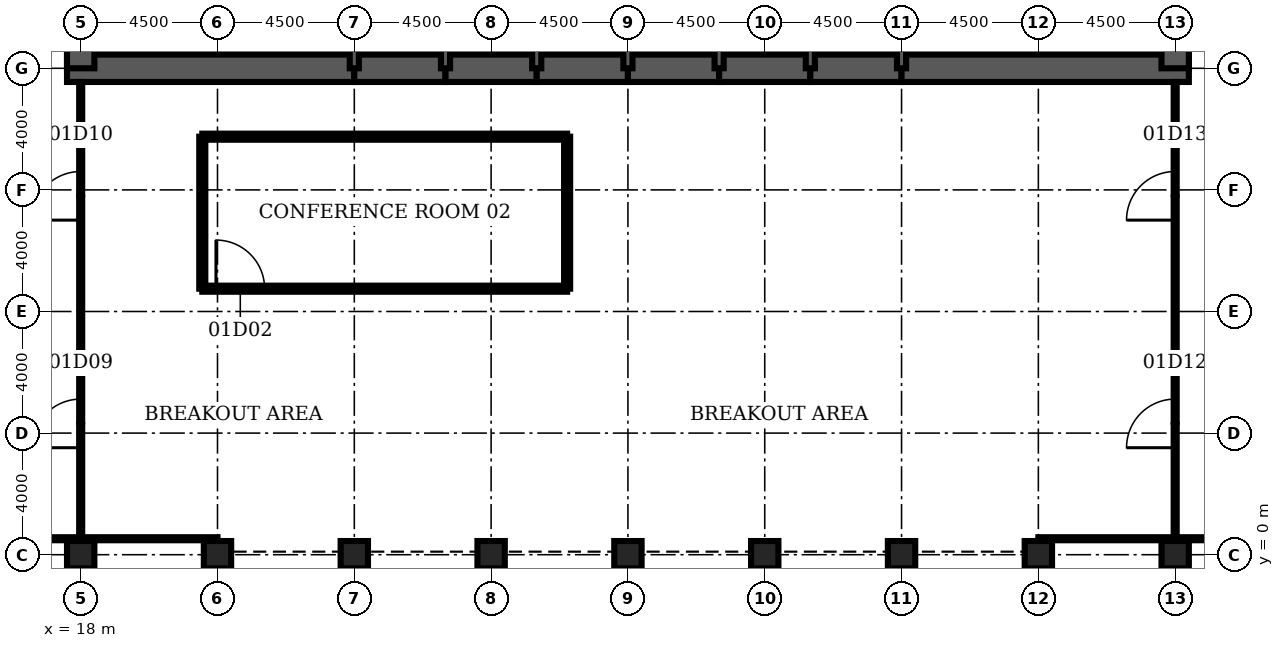
"""IFC4 building model, lengths in metres.
Left out: names, types, materials, properties, quantities, classifications, styles, units other than length and angle.
Written with IfcOpenShell. Run it as: python <this file> out.ifc"""

import sys

from ifc_helpers import new_model, si_unit, direction, frame, frame_2d, origin, origin_2d, place, context, subcontext, project, spatial, rectangle, hollow_rectangle, extrude, element, fill, save


model = new_model("IFC4")
c1 = context("Model", 3, precision=1e-05, world=origin(), true_north=direction((0.0, 1.0)))
c2 = subcontext(c1, "Body", "Model", "MODEL_VIEW")
j1 = project(units=[si_unit("LENGTHUNIT", "METRE"), si_unit("PLANEANGLEUNIT", "RADIAN")], contexts=[c1])
p1 = place(None, origin())
s1 = spatial("IfcSite", under=j1, at=p1, CompositionType="ELEMENT")
p2 = place(p1, origin())
s2 = spatial("IfcBuilding", under=s1, at=p2, CompositionType="ELEMENT")
p3 = place(p2, frame((0.0, 0.0, 6.0)))
s3 = spatial("IfcBuildingStorey", under=s2, at=p3, CompositionType="ELEMENT", Elevation=6.0)
for number, where, z_axis, x_axis in (
    (1, (18.0, 0.0, 0.0), (0.0, 0.0, 1.0), (0.0, 1.0, 0.0)),
    (2, (22.5, 0.0, 0.0), (0.0, 0.0, 1.0), (0.0, 1.0, 0.0)),
    (3, (27.0, 0.0, 0.0), (0.0, 0.0, 1.0), (0.0, 1.0, 0.0)),
    (4, (31.5, 0.0, 0.0), (0.0, 0.0, 1.0), (0.0, 1.0, 0.0)),
    (5, (36.0, 0.0, 0.0), (0.0, 0.0, 1.0), (0.0, 1.0, 0.0)),
    (6, (40.5, 0.0, 0.0), (0.0, 0.0, 1.0), (0.0, 1.0, 0.0)),
    (7, (45.0, 0.0, 0.0), (0.0, 0.0, 1.0), (0.0, 1.0, 0.0)),
    (8, (49.5, 0.0, 0.0), (0.0, 0.0, 1.0), (0.0, 1.0, 0.0)),
    (9, (54.0, 0.0, 0.0), (0.0, 0.0, 1.0), (0.0, 1.0, 0.0)),
):
    element("IfcColumn", number, at=place(p3, frame(where, z_axis=z_axis, x_axis=x_axis)), inside=s3, PredefinedType="COLUMN", context=c2, shape_type="SweptSolid", body=[
        extrude(hollow_rectangle(XDim=0.9, YDim=0.9, WallThickness=0.12, at=origin_2d()), origin(), (0.0, 0.0, 1.0), 7.0),
    ])
p4 = place(p3, frame((17.55, 16.0, 0.0), z_axis=(0.0, 0.0, 1.0), x_axis=(1.0, 0.0, 0.0)))
e10 = element("IfcWall", 10, at=p4, inside=s3, PredefinedType="SHEAR", context=c2, shape_type="SweptSolid", body=[
    extrude(rectangle(XDim=9.45, YDim=0.9, at=frame_2d((4.725, 0.0))), origin(), (0.0, 0.0, 1.0), 7.0),
])
for number, where, z_axis, x_axis in (
    (11, (27.0, 16.0, 0.0), (0.0, 0.0, 1.0), (1.0, 0.0, 0.0)),
    (12, (30.0, 16.0, 0.0), (0.0, 0.0, 1.0), (1.0, 0.0, 0.0)),
    (13, (33.0, 16.0, 0.0), (0.0, 0.0, 1.0), (1.0, 0.0, 0.0)),
    (14, (36.0, 16.0, 0.0), (0.0, 0.0, 1.0), (1.0, 0.0, 0.0)),
    (15, (39.0, 16.0, 0.0), (0.0, 0.0, 1.0), (1.0, 0.0, 0.0)),
    (16, (42.0, 16.0, 0.0), (0.0, 0.0, 1.0), (1.0, 0.0, 0.0)),
):
    element("IfcWall", number, at=place(p3, frame(where, z_axis=z_axis, x_axis=x_axis)), inside=s3, PredefinedType="SHEAR", context=c2, shape_type="SweptSolid", body=[
        extrude(rectangle(XDim=3.0, YDim=0.9, at=frame_2d((1.5, 0.0))), origin(), (0.0, 0.0, 1.0), 7.0),
    ])
p5 = place(p3, frame((45.0, 16.0, 0.0), z_axis=(0.0, 0.0, 1.0), x_axis=(1.0, 0.0, 0.0)))
e17 = element("IfcWall", 17, at=p5, inside=s3, PredefinedType="SHEAR", context=c2, shape_type="SweptSolid", body=[
    extrude(rectangle(XDim=9.45, YDim=0.9, at=frame_2d((4.725, 0.0))), origin(), (0.0, 0.0, 1.0), 7.0),
])
for number, where, z_axis, x_axis in (
    (18, (18.0, 19.2, 0.0), (0.0, 0.0, 1.0), (0.0, -1.0, 0.0)),
    (19, (54.0, 16.0, 0.0), (0.0, 0.0, 1.0), (0.0, 1.0, 0.0)),
):
    element("IfcWall", number, at=place(p3, frame(where, z_axis=z_axis, x_axis=x_axis)), inside=s3, PredefinedType="SHEAR", context=c2, shape_type="SweptSolid", body=[
        extrude(rectangle(XDim=3.2, YDim=0.9, at=frame_2d((1.6, 0.0))), origin(), (0.0, 0.0, 1.0), 7.0),
    ])
for number, where, z_axis, x_axis in (
    (20, (27.0, 16.0, 0.0), (0.0, 0.0, 1.0), (0.0, 1.0, 0.0)),
    (21, (30.0, 16.0, 0.0), (0.0, 0.0, 1.0), (0.0, 1.0, 0.0)),
    (22, (33.0, 16.0, 0.0), (0.0, 0.0, 1.0), (0.0, 1.0, 0.0)),
    (23, (36.0, 16.0, 0.0), (0.0, 0.0, 1.0), (0.0, 1.0, 0.0)),
    (24, (39.0, 16.0, 0.0), (0.0, 0.0, 1.0), (0.0, 1.0, 0.0)),
    (25, (42.0, 16.0, 0.0), (0.0, 0.0, 1.0), (0.0, 1.0, 0.0)),
    (26, (45.0, 16.0, 0.0), (0.0, 0.0, 1.0), (0.0, 1.0, 0.0)),
):
    element("IfcWall", number, at=place(p3, frame(where, z_axis=z_axis, x_axis=x_axis)), inside=s3, PredefinedType="SOLIDWALL", context=c2, shape_type="SweptSolid", body=[
        extrude(rectangle(XDim=3.2, YDim=0.3, at=frame_2d((1.6, 0.0))), origin(), (0.0, 0.0, 1.0), 7.0),
    ])
p6 = place(p3, frame((22.0, 8.75, 0.0), z_axis=(0.0, 0.0, 1.0), x_axis=(1.0, 0.0, 0.0)))
e27 = element("IfcWall", 27, at=p6, inside=s3, PredefinedType="PARTITIONING", context=c2, shape_type="SweptSolid", body=[
    extrude(rectangle(XDim=12.0, YDim=0.2, at=frame_2d((6.0, 0.0))), origin(), (0.0, 0.0, 1.0), 3.0),
])
p7 = place(p6, frame((0.45, 0.0, 0.0)))
e28 = element("IfcOpeningElement", 28, at=p7, cuts=e27, PredefinedType="OPENING", context=c2, shape_type="SweptSolid", body=[
    extrude(rectangle(XDim=1.6, YDim=2.1, at=frame_2d((0.8, 1.05))), frame((0.0, 0.11, 0.0), z_axis=(0.0, -1.0, 0.0), x_axis=(1.0, 0.0, 0.0)), (0.0, 0.0, 1.0), 0.22),
])
p8 = place(p3, frame((22.0, 13.75, 0.0), z_axis=(0.0, 0.0, 1.0), x_axis=(1.0, 0.0, 0.0)))
e29 = element("IfcWall", 29, at=p8, inside=s3, PredefinedType="PARTITIONING", context=c2, shape_type="SweptSolid", body=[
    extrude(rectangle(XDim=12.0, YDim=0.2, at=frame_2d((6.0, 0.0))), origin(), (0.0, 0.0, 1.0), 3.0),
])
p9 = place(p3, frame((18.0, 0.575, 0.0), z_axis=(0.0, 0.0, 1.0), x_axis=(0.0, 1.0, 0.0)))
e30 = element("IfcWall", 30, at=p9, inside=s3, PredefinedType="PARTITIONING", context=c2, shape_type="SweptSolid", body=[
    extrude(rectangle(XDim=14.975, YDim=0.1, at=frame_2d((7.488, 0.0))), origin(), (0.0, 0.0, 1.0), 3.0),
])
p10 = place(p9, frame((2.944, 0.0, 0.0)))
e31 = element("IfcOpeningElement", 31, at=p10, cuts=e30, PredefinedType="OPENING", context=c2, shape_type="SweptSolid", body=[
    extrude(rectangle(XDim=1.6, YDim=2.1, at=frame_2d((0.8, 1.05))), frame((0.0, 0.06, 0.0), z_axis=(0.0, -1.0, 0.0), x_axis=(1.0, 0.0, 0.0)), (0.0, 0.0, 1.0), 0.12),
])
p11 = place(p9, frame((10.431, 0.0, 0.0)))
e32 = element("IfcOpeningElement", 32, at=p11, cuts=e30, PredefinedType="OPENING", context=c2, shape_type="SweptSolid", body=[
    extrude(rectangle(XDim=1.6, YDim=2.1, at=frame_2d((0.8, 1.05))), frame((0.0, 0.06, 0.0), z_axis=(0.0, -1.0, 0.0), x_axis=(1.0, 0.0, 0.0)), (0.0, 0.0, 1.0), 0.12),
])
for number, where, z_axis, x_axis in (
    (33, (22.0, 8.75, 0.0), (0.0, 0.0, 1.0), (0.0, 1.0, 0.0)),
    (34, (34.0, 8.75, 0.0), (0.0, 0.0, 1.0), (0.0, 1.0, 0.0)),
):
    element("IfcWall", number, at=place(p3, frame(where, z_axis=z_axis, x_axis=x_axis)), inside=s3, PredefinedType="PARTITIONING", context=c2, shape_type="SweptSolid", body=[
        extrude(rectangle(XDim=5.0, YDim=0.2, at=frame_2d((2.5, 0.0))), origin(), (0.0, 0.0, 1.0), 3.0),
    ])
p12 = place(p3, frame((54.0, 0.575, 0.0), z_axis=(0.0, 0.0, 1.0), x_axis=(0.0, 1.0, 0.0)))
e35 = element("IfcWall", 35, at=p12, inside=s3, PredefinedType="PARTITIONING", context=c2, shape_type="SweptSolid", body=[
    extrude(rectangle(XDim=14.975, YDim=0.1, at=frame_2d((7.488, 0.0))), origin(), (0.0, 0.0, 1.0), 3.0),
])
p13 = place(p12, frame((2.944, 0.0, 0.0)))
e36 = element("IfcOpeningElement", 36, at=p13, cuts=e35, PredefinedType="OPENING", context=c2, shape_type="SweptSolid", body=[
    extrude(rectangle(XDim=1.6, YDim=2.1, at=frame_2d((0.8, 1.05))), frame((0.0, 0.06, 0.0), z_axis=(0.0, -1.0, 0.0), x_axis=(1.0, 0.0, 0.0)), (0.0, 0.0, 1.0), 0.12),
])
p14 = place(p12, frame((10.431, 0.0, 0.0)))
e37 = element("IfcOpeningElement", 37, at=p14, cuts=e35, PredefinedType="OPENING", context=c2, shape_type="SweptSolid", body=[
    extrude(rectangle(XDim=1.6, YDim=2.1, at=frame_2d((0.8, 1.05))), frame((0.0, 0.06, 0.0), z_axis=(0.0, -1.0, 0.0), x_axis=(1.0, 0.0, 0.0)), (0.0, 0.0, 1.0), 0.12),
])
p15 = place(p3, frame((4.3, 0.525, 0.0), z_axis=(0.0, 0.0, 1.0), x_axis=(1.0, 0.0, 0.0)))
e38 = element("IfcWall", 38, at=p15, inside=s3, PredefinedType="PARTITIONING", context=c2, shape_type="SweptSolid", body=[
    extrude(rectangle(XDim=18.2, YDim=0.1, at=frame_2d((9.1, 0.0))), origin(), (0.0, 0.0, 1.0), 3.0),
])
p16 = place(p15, frame((6.15, 0.0, 0.0)))
e39 = element("IfcOpeningElement", 39, at=p16, cuts=e38, PredefinedType="OPENING", context=c2, shape_type="SweptSolid", body=[
    extrude(rectangle(XDim=1.6, YDim=2.1, at=frame_2d((0.8, 1.05))), frame((0.0, 0.06, 0.0), z_axis=(0.0, -1.0, 0.0), x_axis=(1.0, 0.0, 0.0)), (0.0, 0.0, 1.0), 0.12),
])
p17 = place(p3, frame((49.5, 0.525, 0.0), z_axis=(0.0, 0.0, 1.0), x_axis=(1.0, 0.0, 0.0)))
e40 = element("IfcWall", 40, at=p17, inside=s3, PredefinedType="PARTITIONING", context=c2, shape_type="SweptSolid", body=[
    extrude(rectangle(XDim=18.2, YDim=0.1, at=frame_2d((9.1, 0.0))), origin(), (0.0, 0.0, 1.0), 3.0),
])
p18 = place(p17, frame((10.45, 0.0, 0.0)))
e41 = element("IfcOpeningElement", 41, at=p18, cuts=e40, PredefinedType="OPENING", context=c2, shape_type="SweptSolid", body=[
    extrude(rectangle(XDim=1.6, YDim=2.1, at=frame_2d((0.8, 1.05))), frame((0.0, 0.06, 0.0), z_axis=(0.0, -1.0, 0.0), x_axis=(1.0, 0.0, 0.0)), (0.0, 0.0, 1.0), 0.12),
])
p19 = place(p7, origin())
e42 = element("IfcDoor", 42, at=p19, inside=s3, OperationType="SINGLE_SWING_LEFT", PredefinedType="DOOR", context=c2, shape_type="SweptSolid", body=[
    extrude(rectangle(XDim=1.6, YDim=2.1, at=frame_2d((0.8, 1.05))), frame((0.0, 0.025, 0.0), z_axis=(0.0, -1.0, 0.0), x_axis=(1.0, 0.0, 0.0)), (0.0, 0.0, 1.0), 0.05),
])
fill(e28, e42)
p20 = place(p10, origin())
e43 = element("IfcDoor", 43, at=p20, inside=s3, OperationType="SINGLE_SWING_LEFT", PredefinedType="DOOR", context=c2, shape_type="SweptSolid", body=[
    extrude(rectangle(XDim=1.6, YDim=2.1, at=frame_2d((0.8, 1.05))), frame((0.0, 0.025, 0.0), z_axis=(0.0, -1.0, 0.0), x_axis=(1.0, 0.0, 0.0)), (0.0, 0.0, 1.0), 0.05),
])
fill(e31, e43)
p21 = place(p11, origin())
e44 = element("IfcDoor", 44, at=p21, inside=s3, OperationType="SINGLE_SWING_LEFT", PredefinedType="DOOR", context=c2, shape_type="SweptSolid", body=[
    extrude(rectangle(XDim=1.6, YDim=2.1, at=frame_2d((0.8, 1.05))), frame((0.0, 0.025, 0.0), z_axis=(0.0, -1.0, 0.0), x_axis=(1.0, 0.0, 0.0)), (0.0, 0.0, 1.0), 0.05),
])
fill(e32, e44)
p22 = place(p13, origin())
e45 = element("IfcDoor", 45, at=p22, inside=s3, OperationType="SINGLE_SWING_LEFT", PredefinedType="DOOR", context=c2, shape_type="SweptSolid", body=[
    extrude(rectangle(XDim=1.6, YDim=2.1, at=frame_2d((0.8, 1.05))), frame((0.0, 0.025, 0.0), z_axis=(0.0, -1.0, 0.0), x_axis=(1.0, 0.0, 0.0)), (0.0, 0.0, 1.0), 0.05),
])
fill(e36, e45)
p23 = place(p14, origin())
e46 = element("IfcDoor", 46, at=p23, inside=s3, OperationType="SINGLE_SWING_LEFT", PredefinedType="DOOR", context=c2, shape_type="SweptSolid", body=[
    extrude(rectangle(XDim=1.6, YDim=2.1, at=frame_2d((0.8, 1.05))), frame((0.0, 0.025, 0.0), z_axis=(0.0, -1.0, 0.0), x_axis=(1.0, 0.0, 0.0)), (0.0, 0.0, 1.0), 0.05),
])
fill(e37, e46)
save(model, sys.argv[1])
